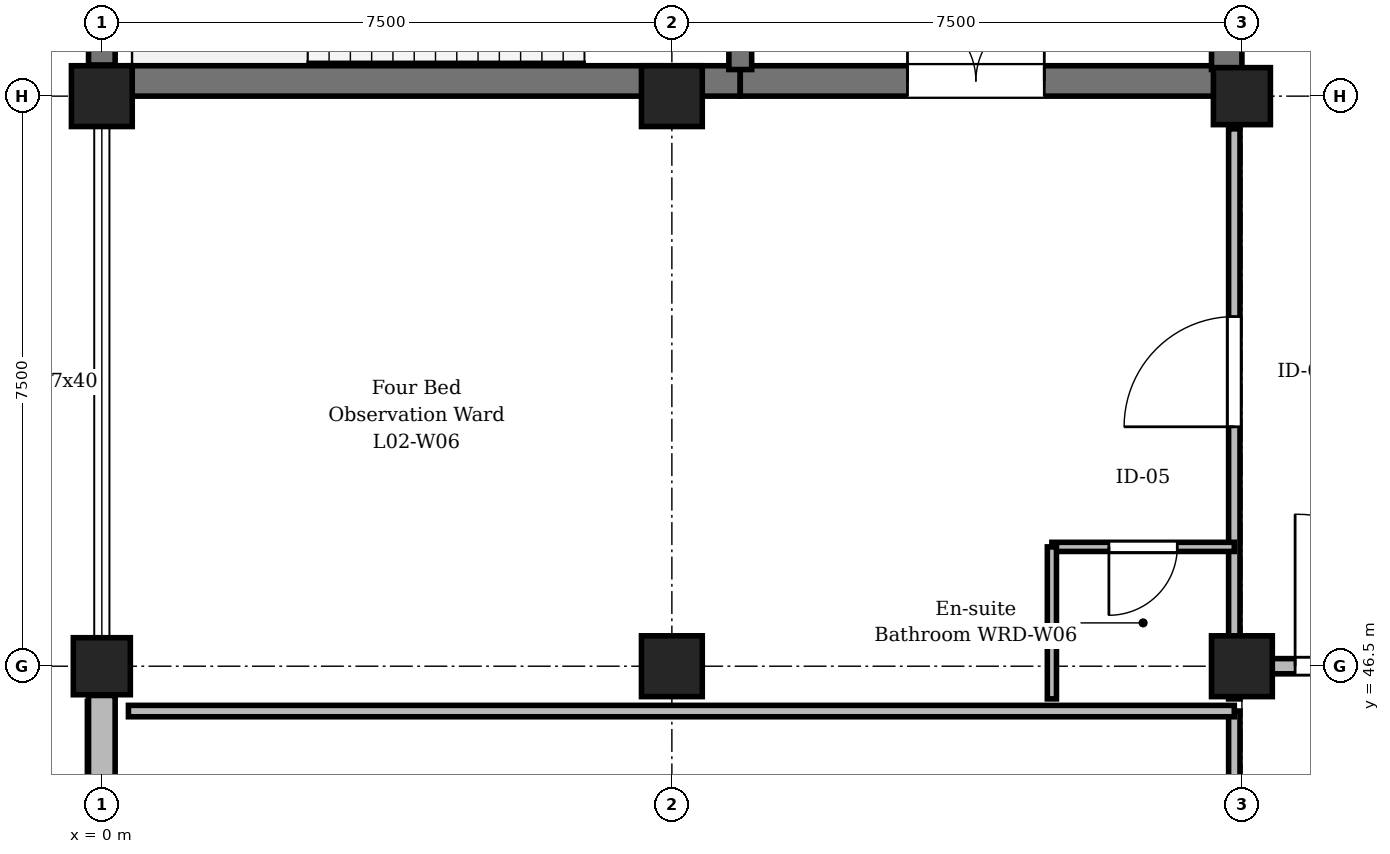
"""IFC4 building model, lengths in metres.
Left out: names, types, materials, properties, quantities, classifications, styles, units other than length and angle.
Written with IfcOpenShell. Run it as: python <this file> out.ifc"""

import sys

from ifc_helpers import new_model, si_unit, direction, frame, frame_2d, origin, origin_2d, place, context, subcontext, project, spatial, rectangle, circle, extrude, element, fill, save


model = new_model("IFC4")
c1 = context("Model", 3, precision=1e-05, world=origin(), true_north=direction((0.0, 1.0)))
c2 = subcontext(c1, "Body", "Model", "MODEL_VIEW")
j1 = project(units=[si_unit("LENGTHUNIT", "METRE"), si_unit("PLANEANGLEUNIT", "RADIAN")], contexts=[c1])
p1 = place(None, origin())
s1 = spatial("IfcSite", under=j1, at=p1, CompositionType="ELEMENT")
p2 = place(p1, origin())
s2 = spatial("IfcBuilding", under=s1, at=p2, CompositionType="ELEMENT")
p3 = place(p2, frame((0.0, 0.0, 9.3)))
s3 = spatial("IfcBuildingStorey", under=s2, at=p3, CompositionType="ELEMENT", Elevation=9.3)
p4 = place(p3, frame((0.0, 46.5, 0.0), z_axis=(0.0, 0.0, 1.0), x_axis=(1.0, 0.0, 0.0)))
e1 = element("IfcColumn", 1, at=p4, inside=s3, PredefinedType="COLUMN", context=c2, shape_type="SweptSolid", body=[
    extrude(circle(Radius=0.375, at=origin_2d()), origin(), (0.0, 0.0, 1.0), 4.8),
])
for number, where, z_axis, x_axis in (
    (2, (0.0, 54.0, 0.0), (0.0, 0.0, 1.0), (1.0, 0.0, 0.0)),
    (3, (7.5, 46.5, 0.0), (0.0, 0.0, 1.0), (1.0, 0.0, 0.0)),
    (4, (7.5, 54.0, 0.0), (0.0, 0.0, 1.0), (1.0, 0.0, 0.0)),
    (5, (15.0, 46.5, 0.0), (0.0, 0.0, 1.0), (1.0, 0.0, 0.0)),
):
    element("IfcColumn", number, at=place(p3, frame(where, z_axis=z_axis, x_axis=x_axis)), inside=s3, PredefinedType="COLUMN", context=c2, shape_type="SweptSolid", body=[
        extrude(rectangle(XDim=0.8, YDim=0.8, at=origin_2d()), origin(), (0.0, 0.0, 1.0), 4.8),
    ])
p5 = place(p3, frame((15.0, 54.0, 0.0), z_axis=(0.0, 0.0, 1.0), x_axis=(1.0, 0.0, 0.0)))
e6 = element("IfcColumn", 6, at=p5, inside=s3, PredefinedType="COLUMN", context=c2, shape_type="SweptSolid", body=[
    extrude(circle(Radius=0.375, at=origin_2d()), origin(), (0.0, 0.0, 1.0), 4.8),
])
p6 = place(p3, frame((0.0, 39.41, 0.0), z_axis=(0.0, 0.0, 1.0), x_axis=(0.0, 1.0, 0.0)))
e7 = element("IfcWall", 7, at=p6, inside=s3, PredefinedType="STANDARD", context=c2, shape_type="SweptSolid", body=[
    extrude(rectangle(XDim=6.705, YDim=0.35, at=frame_2d((3.353, 0.0))), origin(), (0.0, 0.0, 1.0), 3.95),
])
p7 = place(p6, frame((2.353, 0.0, 0.9)))
e8 = element("IfcOpeningElement", 8, at=p7, cuts=e7, PredefinedType="OPENING", context=c2, shape_type="SweptSolid", body=[
    extrude(rectangle(XDim=2.0, YDim=1.95, at=frame_2d((1.0, 0.975))), frame((0.0, 0.185, 0.0), z_axis=(0.0, -1.0, 0.0), x_axis=(1.0, 0.0, 0.0)), (0.0, 0.0, 1.0), 0.37),
])
p8 = place(p3, frame((0.0, 54.41, 0.0), z_axis=(0.0, 0.0, 1.0), x_axis=(0.0, 1.0, 0.0)))
e9 = element("IfcWall", 9, at=p8, inside=s3, PredefinedType="SHEAR", context=c2, shape_type="SweptSolid", body=[
    extrude(rectangle(XDim=6.68, YDim=0.35, at=frame_2d((3.34, 0.0))), origin(), (0.0, 0.0, 1.0), 4.55),
])
p9 = place(p3, frame((0.35, 54.2, 0.0), z_axis=(0.0, 0.0, 1.0), x_axis=(1.0, 0.0, 0.0)))
e10 = element("IfcWall", 10, at=p9, inside=s3, PredefinedType="SHEAR", context=c2, shape_type="SweptSolid", body=[
    extrude(rectangle(XDim=8.05, YDim=0.4, at=frame_2d((4.025, 0.0))), origin(), (0.0, 0.0, 1.0), 4.55),
])
p10 = place(p3, frame((8.4, 54.2, 0.0), z_axis=(0.0, 0.0, 1.0), x_axis=(1.0, 0.0, 0.0)))
e11 = element("IfcWall", 11, at=p10, inside=s3, PredefinedType="SHEAR", context=c2, shape_type="SweptSolid", body=[
    extrude(rectangle(XDim=6.25, YDim=0.4, at=frame_2d((3.125, 0.0))), origin(), (0.0, 0.0, 1.0), 4.55),
])
p11 = place(p10, frame((2.2, 0.0, 0.0)))
e12 = element("IfcOpeningElement", 12, at=p11, cuts=e11, PredefinedType="OPENING", context=c2, shape_type="SweptSolid", body=[
    extrude(rectangle(XDim=1.8, YDim=2.25, at=frame_2d((0.9, 1.125))), frame((0.0, 0.21, 0.0), z_axis=(0.0, -1.0, 0.0), x_axis=(1.0, 0.0, 0.0)), (0.0, 0.0, 1.0), 0.42),
])
p12 = place(p3, frame((14.8, 54.35, 0.0), z_axis=(0.0, 0.0, 1.0), x_axis=(0.0, 1.0, 0.0)))
e13 = element("IfcWall", 13, at=p12, inside=s3, PredefinedType="SHEAR", context=c2, shape_type="SweptSolid", body=[
    extrude(rectangle(XDim=3.75, YDim=0.4, at=frame_2d((1.875, 0.0))), origin(), (0.0, 0.0, 1.0), 4.55),
])
p13 = place(p3, frame((8.4, 58.0, 0.0), z_axis=(0.0, 0.0, 1.0), x_axis=(0.0, -1.0, 0.0)))
e14 = element("IfcWall", 14, at=p13, inside=s3, PredefinedType="SHEAR", context=c2, shape_type="SweptSolid", body=[
    extrude(rectangle(XDim=3.65, YDim=0.3, at=frame_2d((1.825, 0.0))), origin(), (0.0, 0.0, 1.0), 4.55),
])
p14 = place(p13, frame((1.22, 0.0, 0.0)))
e15 = element("IfcOpeningElement", 15, at=p14, cuts=e14, PredefinedType="OPENING", context=c2, shape_type="SweptSolid", body=[
    extrude(rectangle(XDim=1.2, YDim=2.25, at=frame_2d((0.6, 1.125))), frame((0.0, 0.16, 0.0), z_axis=(0.0, -1.0, 0.0), x_axis=(1.0, 0.0, 0.0)), (0.0, 0.0, 1.0), 0.32),
])
p15 = place(p3, frame((14.9, 38.41, 0.0), z_axis=(0.0, 0.0, 1.0), x_axis=(0.0, 1.0, 0.0)))
e16 = element("IfcWall", 16, at=p15, inside=s3, PredefinedType="PARTITIONING", context=c2, shape_type="SweptSolid", body=[
    extrude(rectangle(XDim=7.5, YDim=0.15, at=frame_2d((3.75, 0.0))), origin(), (0.0, 0.0, 1.0), 3.985),
])
p16 = place(p15, frame((3.64, 0.0, 0.0)))
e17 = element("IfcOpeningElement", 17, at=p16, cuts=e16, PredefinedType="OPENING", context=c2, shape_type="SweptSolid", body=[
    extrude(rectangle(XDim=1.35, YDim=2.25, at=frame_2d((0.675, 1.125))), frame((0.0, 0.085, 0.0), z_axis=(0.0, -1.0, 0.0), x_axis=(1.0, 0.0, 0.0)), (0.0, 0.0, 1.0), 0.17),
])
p17 = place(p3, frame((14.9, 46.07, 0.0), z_axis=(0.0, 0.0, 1.0), x_axis=(0.0, 1.0, 0.0)))
e18 = element("IfcWall", 18, at=p17, inside=s3, PredefinedType="PARTITIONING", context=c2, shape_type="SweptSolid", body=[
    extrude(rectangle(XDim=7.5, YDim=0.15, at=frame_2d((3.75, 0.0))), origin(), (0.0, 0.0, 1.0), 3.985),
])
p18 = place(p17, frame((3.58, 0.0, 0.0)))
e19 = element("IfcOpeningElement", 19, at=p18, cuts=e18, PredefinedType="OPENING", context=c2, shape_type="SweptSolid", body=[
    extrude(rectangle(XDim=1.45, YDim=2.3, at=frame_2d((0.725, 1.15))), frame((0.0, 0.085, 0.0), z_axis=(0.0, -1.0, 0.0), x_axis=(1.0, 0.0, 0.0)), (0.0, 0.0, 1.0), 0.17),
])
p19 = place(p3, frame((14.9, 48.07, 0.0), z_axis=(0.0, 0.0, 1.0), x_axis=(-1.0, 0.0, 0.0)))
e20 = element("IfcWall", 20, at=p19, inside=s3, PredefinedType="PARTITIONING", context=c2, shape_type="SweptSolid", body=[
    extrude(rectangle(XDim=2.4, YDim=0.12, at=frame_2d((1.2, 0.0))), origin(), (0.0, 0.0, 1.0), 4.535),
])
p20 = place(p19, frame((0.75, 0.0, 0.0)))
e21 = element("IfcOpeningElement", 21, at=p20, cuts=e20, PredefinedType="OPENING", context=c2, shape_type="SweptSolid", body=[
    extrude(rectangle(XDim=0.9, YDim=2.1, at=frame_2d((0.45, 1.05))), frame((0.0, 0.07, 0.0), z_axis=(0.0, -1.0, 0.0), x_axis=(1.0, 0.0, 0.0)), (0.0, 0.0, 1.0), 0.14),
])
p21 = place(p3, frame((12.5, 46.07, 0.0), z_axis=(0.0, 0.0, 1.0), x_axis=(0.0, 1.0, 0.0)))
e22 = element("IfcWall", 22, at=p21, inside=s3, PredefinedType="PARTITIONING", context=c2, shape_type="SweptSolid", body=[
    extrude(rectangle(XDim=2.0, YDim=0.12, at=frame_2d((1.0, 0.0))), origin(), (0.0, 0.0, 1.0), 4.535),
])
p22 = place(p3, frame((0.35, 45.91, 0.0), z_axis=(0.0, 0.0, 1.0), x_axis=(1.0, 0.0, 0.0)))
e23 = element("IfcWall", 23, at=p22, inside=s3, PredefinedType="PARTITIONING", context=c2, shape_type="SweptSolid", body=[
    extrude(rectangle(XDim=14.55, YDim=0.15, at=frame_2d((7.275, 0.0))), origin(), (0.0, 0.0, 1.0), 4.535),
])
p23 = place(p3, frame((15.2, 46.5, 0.0), z_axis=(0.0, 0.0, 1.0), x_axis=(1.0, 0.0, 0.0)))
e24 = element("IfcWall", 24, at=p23, inside=s3, PredefinedType="STANDARD", context=c2, shape_type="SweptSolid", body=[
    extrude(rectangle(XDim=3.0, YDim=0.2, at=frame_2d((1.5, 0.0))), origin(), (0.0, 0.0, 1.0), 3.985),
])
p24 = place(p23, frame((0.5, 0.0, 0.0)))
e25 = element("IfcOpeningElement", 25, at=p24, cuts=e24, PredefinedType="OPENING", context=c2, shape_type="SweptSolid", body=[
    extrude(rectangle(XDim=2.0, YDim=2.3, at=frame_2d((1.0, 1.15))), frame((0.0, 0.11, 0.0), z_axis=(0.0, -1.0, 0.0), x_axis=(1.0, 0.0, 0.0)), (0.0, 0.0, 1.0), 0.22),
])
p25 = place(p11, origin())
e26 = element("IfcDoor", 26, at=p25, inside=s3, OperationType="DOUBLE_DOOR_SINGLE_SWING", PredefinedType="DOOR", context=c2, shape_type="SweptSolid", body=[
    extrude(rectangle(XDim=1.8, YDim=2.25, at=frame_2d((0.9, 1.125))), frame((0.0, 0.025, 0.0), z_axis=(0.0, -1.0, 0.0), x_axis=(1.0, 0.0, 0.0)), (0.0, 0.0, 1.0), 0.05),
])
fill(e12, e26)
p26 = place(p18, origin())
e27 = element("IfcDoor", 27, at=p26, inside=s3, OperationType="SINGLE_SWING_LEFT", PredefinedType="DOOR", context=c2, shape_type="SweptSolid", body=[
    extrude(rectangle(XDim=1.45, YDim=2.3, at=frame_2d((0.725, 1.15))), frame((0.0, 0.025, 0.0), z_axis=(0.0, -1.0, 0.0), x_axis=(1.0, 0.0, 0.0)), (0.0, 0.0, 1.0), 0.05),
])
fill(e19, e27)
p27 = place(p20, origin())
e28 = element("IfcDoor", 28, at=p27, inside=s3, OperationType="SINGLE_SWING_RIGHT", PredefinedType="DOOR", context=c2, shape_type="SweptSolid", body=[
    extrude(rectangle(XDim=0.9, YDim=2.1, at=frame_2d((0.45, 1.05))), frame((0.0, 0.025, 0.0), z_axis=(0.0, -1.0, 0.0), x_axis=(1.0, 0.0, 0.0)), (0.0, 0.0, 1.0), 0.05),
])
fill(e21, e28)
p28 = place(p24, origin())
e29 = element("IfcDoor", 29, at=p28, inside=s3, OperationType="DOUBLE_DOOR_SINGLE_SWING", PredefinedType="DOOR", context=c2, shape_type="SweptSolid", body=[
    extrude(rectangle(XDim=2.0, YDim=2.3, at=frame_2d((1.0, 1.15))), frame((0.0, 0.025, 0.0), z_axis=(0.0, -1.0, 0.0), x_axis=(1.0, 0.0, 0.0)), (0.0, 0.0, 1.0), 0.05),
])
fill(e25, e29)
save(model, sys.argv[1])
